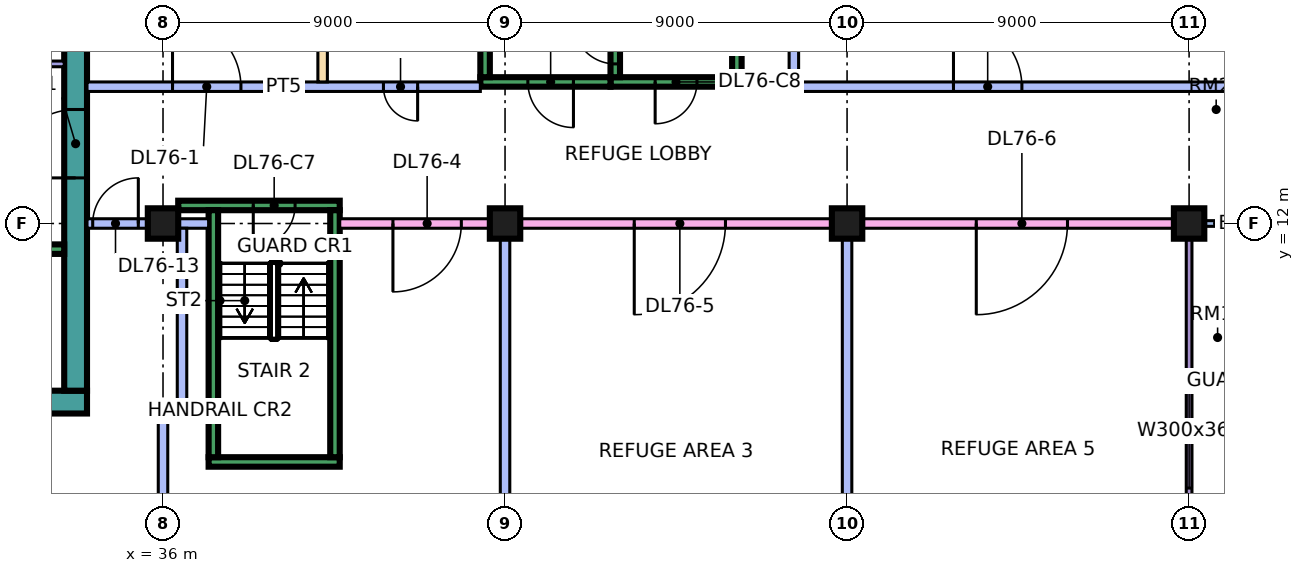
"""IFC4 building model, lengths in metres.
Left out: names, types, materials, properties, quantities, classifications, styles, units other than length and angle.
Written with IfcOpenShell. Run it as: python <this file> out.ifc"""

import sys

from ifc_helpers import new_model, si_unit, direction, frame, frame_2d, origin, origin_2d, place, context, subcontext, project, spatial, rectangle, extrude, element, fill, save


model = new_model("IFC4")
c1 = context("Model", 3, precision=1e-05, world=origin(), true_north=direction((0.0, 1.0)))
c2 = subcontext(c1, "Body", "Model", "MODEL_VIEW")
j1 = project(units=[si_unit("LENGTHUNIT", "METRE"), si_unit("PLANEANGLEUNIT", "RADIAN")], contexts=[c1])
p1 = place(None, origin())
s1 = spatial("IfcSite", under=j1, at=p1, CompositionType="ELEMENT")
p2 = place(p1, origin())
s2 = spatial("IfcBuilding", under=s1, at=p2, CompositionType="ELEMENT")
p3 = place(p2, frame((0.0, 0.0, 322.15)))
s3 = spatial("IfcBuildingStorey", under=s2, at=p3, CompositionType="ELEMENT", Elevation=322.15)
for number, where, z_axis, x_axis in (
    (1, (36.0, 12.0, 0.0), (0.0, 0.0, 1.0), (1.0, 0.0, 0.0)),
    (2, (45.0, 12.0, 0.0), (0.0, 0.0, 1.0), (1.0, 0.0, 0.0)),
    (3, (54.0, 12.0, 0.0), (0.0, 0.0, 1.0), (1.0, 0.0, 0.0)),
    (4, (63.0, 12.0, 0.0), (0.0, 0.0, 1.0), (1.0, 0.0, 0.0)),
):
    element("IfcColumn", number, at=place(p3, frame(where, z_axis=z_axis, x_axis=x_axis)), inside=s3, PredefinedType="COLUMN", context=c2, shape_type="SweptSolid", body=[
        extrude(rectangle(XDim=0.8, YDim=0.8, at=origin_2d()), origin(), (0.0, 0.0, 1.0), 5.5),
    ])
p4 = place(p3, frame((9.0, 7.3, 0.0), z_axis=(0.0, 0.0, 1.0), x_axis=(1.0, 0.0, 0.0)))
e5 = element("IfcWall", 5, at=p4, inside=s3, PredefinedType="SHEAR", context=c2, shape_type="SweptSolid", body=[
    extrude(rectangle(XDim=25.0, YDim=0.6, at=frame_2d((12.5, 0.0))), origin(), (0.0, 0.0, 1.0), 5.5),
])
p5 = place(p3, frame((33.7, 7.6, 0.0), z_axis=(0.0, 0.0, 1.0), x_axis=(0.0, 1.0, 0.0)))
e6 = element("IfcWall", 6, at=p5, inside=s3, PredefinedType="SHEAR", context=c2, shape_type="SweptSolid", body=[
    extrude(rectangle(XDim=11.8, YDim=0.6, at=frame_2d((5.9, 0.0))), origin(), (0.0, 0.0, 1.0), 5.5),
])
p6 = place(p5, frame((5.6, 0.0, 0.0)))
e7 = element("IfcOpeningElement", 7, at=p6, cuts=e6, PredefinedType="OPENING", context=c2, shape_type="SweptSolid", body=[
    extrude(rectangle(XDim=1.8, YDim=2.4, at=frame_2d((0.9, 1.2))), frame((0.0, 0.31, 0.0), z_axis=(0.0, -1.0, 0.0), x_axis=(1.0, 0.0, 0.0)), (0.0, 0.0, 1.0), 0.62),
])
p7 = place(p3, frame((13.45, 11.325, 0.0), z_axis=(0.0, 0.0, 1.0), x_axis=(1.0, 0.0, 0.0)))
e8 = element("IfcWall", 8, at=p7, inside=s3, PredefinedType="SHEAR", context=c2, shape_type="SweptSolid", body=[
    extrude(rectangle(XDim=19.95, YDim=0.25, at=frame_2d((9.975, 0.0))), origin(), (0.0, 0.0, 1.0), 5.5),
])
p8 = place(p7, frame((1.55, 0.0, 0.0)))
e9 = element("IfcOpeningElement", 9, at=p8, cuts=e8, PredefinedType="OPENING", context=c2, shape_type="SweptSolid", body=[
    extrude(rectangle(XDim=0.9, YDim=2.1, at=frame_2d((0.45, 1.05))), frame((0.0, 0.135, 0.0), z_axis=(0.0, -1.0, 0.0), x_axis=(1.0, 0.0, 0.0)), (0.0, 0.0, 1.0), 0.27),
])
p9 = place(p7, frame((5.05, 0.0, 0.0)))
e10 = element("IfcOpeningElement", 10, at=p9, cuts=e8, PredefinedType="OPENING", context=c2, shape_type="SweptSolid", body=[
    extrude(rectangle(XDim=0.9, YDim=2.1, at=frame_2d((0.45, 1.05))), frame((0.0, 0.135, 0.0), z_axis=(0.0, -1.0, 0.0), x_axis=(1.0, 0.0, 0.0)), (0.0, 0.0, 1.0), 0.27),
])
p10 = place(p7, frame((8.425, 0.0, 0.0)))
e11 = element("IfcOpeningElement", 11, at=p10, cuts=e8, PredefinedType="OPENING", context=c2, shape_type="SweptSolid", body=[
    extrude(rectangle(XDim=0.9, YDim=2.1, at=frame_2d((0.45, 1.05))), frame((0.0, 0.135, 0.0), z_axis=(0.0, -1.0, 0.0), x_axis=(1.0, 0.0, 0.0)), (0.0, 0.0, 1.0), 0.27),
])
p11 = place(p7, frame((15.025, 0.0, 0.0)))
e12 = element("IfcOpeningElement", 12, at=p11, cuts=e8, PredefinedType="OPENING", context=c2, shape_type="SweptSolid", body=[
    extrude(rectangle(XDim=0.9, YDim=2.1, at=frame_2d((0.45, 1.05))), frame((0.0, 0.135, 0.0), z_axis=(0.0, -1.0, 0.0), x_axis=(1.0, 0.0, 0.0)), (0.0, 0.0, 1.0), 0.27),
])
p12 = place(p3, frame((37.2, 5.725, 0.0), z_axis=(0.0, 0.0, 1.0), x_axis=(1.0, 0.0, 0.0)))
e13 = element("IfcWall", 13, at=p12, inside=s3, PredefinedType="SHEAR", context=c2, shape_type="SweptSolid", body=[
    extrude(rectangle(XDim=3.45, YDim=0.25, at=frame_2d((1.725, 0.0))), origin(), (0.0, 0.0, 1.0), 5.5),
])
p13 = place(p3, frame((36.4, 12.475, 0.0), z_axis=(0.0, 0.0, 1.0), x_axis=(1.0, 0.0, 0.0)))
e14 = element("IfcWall", 14, at=p13, inside=s3, PredefinedType="SHEAR", context=c2, shape_type="SweptSolid", body=[
    extrude(rectangle(XDim=4.25, YDim=0.25, at=frame_2d((2.125, 0.0))), origin(), (0.0, 0.0, 1.0), 5.5),
])
p14 = place(p13, frame((1.975, 0.0, 0.0)))
e15 = element("IfcOpeningElement", 15, at=p14, cuts=e14, PredefinedType="OPENING", context=c2, shape_type="SweptSolid", body=[
    extrude(rectangle(XDim=1.1, YDim=2.2, at=frame_2d((0.55, 1.1))), frame((0.0, 0.135, 0.0), z_axis=(0.0, -1.0, 0.0), x_axis=(1.0, 0.0, 0.0)), (0.0, 0.0, 1.0), 0.27),
])
for number, where, z_axis, x_axis in (
    (16, (37.325, 5.85, 0.0), (0.0, 0.0, 1.0), (0.0, 1.0, 0.0)),
    (17, (40.525, 5.85, 0.0), (0.0, 0.0, 1.0), (0.0, 1.0, 0.0)),
):
    element("IfcWall", number, at=place(p3, frame(where, z_axis=z_axis, x_axis=x_axis)), inside=s3, PredefinedType="SHEAR", context=c2, shape_type="SweptSolid", body=[
        extrude(rectangle(XDim=6.5, YDim=0.25, at=frame_2d((3.25, 0.0))), origin(), (0.0, 0.0, 1.0), 5.5),
    ])
p15 = place(p3, frame((47.775, 15.725, 0.0), z_axis=(0.0, 0.0, 1.0), x_axis=(1.0, 0.0, 0.0)))
e18 = element("IfcWall", 18, at=p15, inside=s3, PredefinedType="SHEAR", context=c2, shape_type="SweptSolid", body=[
    extrude(rectangle(XDim=3.45, YDim=0.25, at=frame_2d((1.725, 0.0))), origin(), (0.0, 0.0, 1.0), 5.5),
])
p16 = place(p15, frame((1.175, 0.0, 0.0)))
e19 = element("IfcOpeningElement", 19, at=p16, cuts=e18, PredefinedType="OPENING", context=c2, shape_type="SweptSolid", body=[
    extrude(rectangle(XDim=1.1, YDim=2.2, at=frame_2d((0.55, 1.1))), frame((0.0, 0.135, 0.0), z_axis=(0.0, -1.0, 0.0), x_axis=(1.0, 0.0, 0.0)), (0.0, 0.0, 1.0), 0.27),
])
p17 = place(p3, frame((47.9, 15.85, 0.0), z_axis=(0.0, 0.0, 1.0), x_axis=(0.0, 1.0, 0.0)))
e20 = element("IfcWall", 20, at=p17, inside=s3, PredefinedType="SHEAR", context=c2, shape_type="SweptSolid", body=[
    extrude(rectangle(XDim=6.5, YDim=0.25, at=frame_2d((3.25, 0.0))), origin(), (0.0, 0.0, 1.0), 5.5),
])
p18 = place(p17, frame((0.35, 0.0, 0.0)))
e21 = element("IfcOpeningElement", 21, at=p18, cuts=e20, PredefinedType="OPENING", context=c2, shape_type="SweptSolid", body=[
    extrude(rectangle(XDim=1.1, YDim=2.2, at=frame_2d((0.55, 1.1))), frame((0.0, 0.135, 0.0), z_axis=(0.0, -1.0, 0.0), x_axis=(1.0, 0.0, 0.0)), (0.0, 0.0, 1.0), 0.27),
])
p19 = place(p3, frame((51.1, 15.85, 0.0), z_axis=(0.0, 0.0, 1.0), x_axis=(0.0, 1.0, 0.0)))
e22 = element("IfcWall", 22, at=p19, inside=s3, PredefinedType="SHEAR", context=c2, shape_type="SweptSolid", body=[
    extrude(rectangle(XDim=6.5, YDim=0.25, at=frame_2d((3.25, 0.0))), origin(), (0.0, 0.0, 1.0), 5.5),
])
p20 = place(p3, frame((44.35, 15.725, 0.0), z_axis=(0.0, 0.0, 1.0), x_axis=(1.0, 0.0, 0.0)))
e23 = element("IfcWall", 23, at=p20, inside=s3, PredefinedType="SHEAR", context=c2, shape_type="SweptSolid", body=[
    extrude(rectangle(XDim=3.425, YDim=0.25, at=frame_2d((1.712, 0.0))), origin(), (0.0, 0.0, 1.0), 5.5),
])
p21 = place(p20, frame((1.25, 0.0, 0.0)))
e24 = element("IfcOpeningElement", 24, at=p21, cuts=e23, PredefinedType="OPENING", context=c2, shape_type="SweptSolid", body=[
    extrude(rectangle(XDim=1.2, YDim=2.2, at=frame_2d((0.6, 1.1))), frame((0.0, 0.135, 0.0), z_axis=(0.0, -1.0, 0.0), x_axis=(1.0, 0.0, 0.0)), (0.0, 0.0, 1.0), 0.27),
])
p22 = place(p3, frame((44.475, 15.85, 0.0), z_axis=(0.0, 0.0, 1.0), x_axis=(0.0, 1.0, 0.0)))
e25 = element("IfcWall", 25, at=p22, inside=s3, PredefinedType="SHEAR", context=c2, shape_type="SweptSolid", body=[
    extrude(rectangle(XDim=6.5, YDim=0.25, at=frame_2d((3.25, 0.0))), origin(), (0.0, 0.0, 1.0), 5.5),
])
p23 = place(p22, frame((1.75, 0.0, 0.0)))
e26 = element("IfcOpeningElement", 26, at=p23, cuts=e25, PredefinedType="OPENING", context=c2, shape_type="SweptSolid", body=[
    extrude(rectangle(XDim=1.1, YDim=2.2, at=frame_2d((0.55, 1.1))), frame((0.0, 0.135, 0.0), z_axis=(0.0, -1.0, 0.0), x_axis=(1.0, 0.0, 0.0)), (0.0, 0.0, 1.0), 0.27),
])
p24 = place(p22, frame((4.3, 0.0, 0.0)))
e27 = element("IfcOpeningElement", 27, at=p24, cuts=e25, PredefinedType="OPENING", context=c2, shape_type="SweptSolid", body=[
    extrude(rectangle(XDim=1.1, YDim=2.2, at=frame_2d((0.55, 1.1))), frame((0.0, 0.135, 0.0), z_axis=(0.0, -1.0, 0.0), x_axis=(1.0, 0.0, 0.0)), (0.0, 0.0, 1.0), 0.27),
])
p25 = place(p3, frame((63.0, 1.575, 0.0), z_axis=(0.0, 0.0, 1.0), x_axis=(0.0, 1.0, 0.0)))
e28 = element("IfcWall", 28, at=p25, inside=s3, PredefinedType="SOLIDWALL", context=c2, shape_type="SweptSolid", body=[
    extrude(rectangle(XDim=10.35, YDim=0.15, at=frame_2d((5.175, 0.0))), origin(), (0.0, 0.0, 1.0), 5.05),
])
p26 = place(p25, frame((3.462, 0.0, 0.45)))
e29 = element("IfcOpeningElement", 29, at=p26, cuts=e28, PredefinedType="OPENING", context=c2, shape_type="SweptSolid", body=[
    extrude(rectangle(XDim=3.0, YDim=3.6, at=frame_2d((1.5, 1.8))), frame((0.0, 0.085, 0.0), z_axis=(0.0, -1.0, 0.0), x_axis=(1.0, 0.0, 0.0)), (0.0, 0.0, 1.0), 0.17),
])
p27 = place(p3, frame((64.5, 12.0, 0.0), z_axis=(0.0, 0.0, 1.0), x_axis=(-1.0, 0.0, 0.0)))
e30 = element("IfcWall", 30, at=p27, inside=s3, PredefinedType="SOLIDWALL", context=c2, shape_type="SweptSolid", body=[
    extrude(rectangle(XDim=1.5, YDim=0.15, at=frame_2d((0.75, 0.0))), origin(), (0.0, 0.0, 1.0), 5.05),
])
p28 = place(p3, frame((31.4, 16.2, 0.0), z_axis=(0.0, 0.0, 1.0), x_axis=(1.0, 0.0, 0.0)))
e31 = element("IfcWall", 31, at=p28, inside=s3, PredefinedType="PARTITIONING", context=c2, shape_type="SweptSolid", body=[
    extrude(rectangle(XDim=2.0, YDim=0.15, at=frame_2d((1.0, 0.0))), origin(), (0.0, 0.0, 1.0), 5.05),
])
p29 = place(p3, frame((34.0, 12.0, 0.0), z_axis=(0.0, 0.0, 1.0), x_axis=(1.0, 0.0, 0.0)))
e32 = element("IfcWall", 32, at=p29, inside=s3, PredefinedType="PARTITIONING", context=c2, shape_type="SweptSolid", body=[
    extrude(rectangle(XDim=3.2, YDim=0.25, at=frame_2d((1.6, 0.0))), origin(), (0.0, 0.0, 1.0), 5.05),
])
p30 = place(p29, frame((0.15, 0.0, 0.0)))
e33 = element("IfcOpeningElement", 33, at=p30, cuts=e32, PredefinedType="OPENING", context=c2, shape_type="SweptSolid", body=[
    extrude(rectangle(XDim=1.2, YDim=2.1, at=frame_2d((0.6, 1.05))), frame((0.0, 0.135, 0.0), z_axis=(0.0, -1.0, 0.0), x_axis=(1.0, 0.0, 0.0)), (0.0, 0.0, 1.0), 0.27),
])
p31 = place(p3, frame((34.0, 15.6, 0.0), z_axis=(0.0, 0.0, 1.0), x_axis=(1.0, 0.0, 0.0)))
e34 = element("IfcWall", 34, at=p31, inside=s3, PredefinedType="PARTITIONING", context=c2, shape_type="SweptSolid", body=[
    extrude(rectangle(XDim=10.35, YDim=0.25, at=frame_2d((5.175, 0.0))), origin(), (0.0, 0.0, 1.0), 5.05),
])
p32 = place(p31, frame((2.25, 0.0, 0.0)))
e35 = element("IfcOpeningElement", 35, at=p32, cuts=e34, PredefinedType="OPENING", context=c2, shape_type="SweptSolid", body=[
    extrude(rectangle(XDim=1.8, YDim=2.1, at=frame_2d((0.9, 1.05))), frame((0.0, 0.135, 0.0), z_axis=(0.0, -1.0, 0.0), x_axis=(1.0, 0.0, 0.0)), (0.0, 0.0, 1.0), 0.27),
])
p33 = place(p31, frame((7.8, 0.0, 0.0)))
e36 = element("IfcOpeningElement", 36, at=p33, cuts=e34, PredefinedType="OPENING", context=c2, shape_type="SweptSolid", body=[
    extrude(rectangle(XDim=0.9, YDim=2.1, at=frame_2d((0.45, 1.05))), frame((0.0, 0.135, 0.0), z_axis=(0.0, -1.0, 0.0), x_axis=(1.0, 0.0, 0.0)), (0.0, 0.0, 1.0), 0.27),
])
p34 = place(p3, frame((36.0, 0.0, 0.0), z_axis=(0.0, 0.0, 1.0), x_axis=(0.0, 1.0, 0.0)))
e37 = element("IfcWall", 37, at=p34, inside=s3, PredefinedType="PARTITIONING", context=c2, shape_type="SweptSolid", body=[
    extrude(rectangle(XDim=7.125, YDim=0.25, at=frame_2d((3.562, 0.0))), origin(), (0.0, 0.0, 1.0), 5.05),
])
p35 = place(p3, frame((36.125, 7.0, 0.0), z_axis=(0.0, 0.0, 1.0), x_axis=(1.0, 0.0, 0.0)))
e38 = element("IfcWall", 38, at=p35, inside=s3, PredefinedType="PARTITIONING", context=c2, shape_type="SweptSolid", body=[
    extrude(rectangle(XDim=0.25, YDim=0.25, at=frame_2d((0.125, 0.0))), origin(), (0.0, 0.0, 1.0), 5.05),
])
p36 = place(p3, frame((36.5, 6.875, 0.0), z_axis=(0.0, 0.0, 1.0), x_axis=(0.0, 1.0, 0.0)))
e39 = element("IfcWall", 39, at=p36, inside=s3, PredefinedType="PARTITIONING", context=c2, shape_type="SweptSolid", body=[
    extrude(rectangle(XDim=5.0, YDim=0.25, at=frame_2d((2.5, 0.0))), origin(), (0.0, 0.0, 1.0), 5.05),
])
p37 = place(p3, frame((40.2, 15.725, 0.0), z_axis=(0.0, 0.0, 1.0), x_axis=(0.0, 1.0, 0.0)))
e40 = element("IfcWall", 40, at=p37, inside=s3, PredefinedType="PARTITIONING", context=c2, shape_type="SweptSolid", body=[
    extrude(rectangle(XDim=9.863, YDim=0.25, at=frame_2d((4.931, 0.0))), origin(), (0.0, 0.0, 1.0), 5.05),
])
p38 = place(p3, frame((40.65, 12.0, 0.0), z_axis=(0.0, 0.0, 1.0), x_axis=(1.0, 0.0, 0.0)))
e41 = element("IfcWall", 41, at=p38, inside=s3, PredefinedType="PARTITIONING", context=c2, shape_type="SweptSolid", body=[
    extrude(rectangle(XDim=22.35, YDim=0.25, at=frame_2d((11.175, 0.0))), origin(), (0.0, 0.0, 1.0), 2.45),
])
p39 = place(p38, frame((1.4, 0.0, 0.0)))
e42 = element("IfcOpeningElement", 42, at=p39, cuts=e41, PredefinedType="OPENING", context=c2, shape_type="SweptSolid", body=[
    extrude(rectangle(XDim=1.8, YDim=2.1, at=frame_2d((0.9, 1.05))), frame((0.0, 0.135, 0.0), z_axis=(0.0, -1.0, 0.0), x_axis=(1.0, 0.0, 0.0)), (0.0, 0.0, 1.0), 0.27),
])
p40 = place(p38, frame((7.75, 0.0, 0.0)))
e43 = element("IfcOpeningElement", 43, at=p40, cuts=e41, PredefinedType="OPENING", context=c2, shape_type="SweptSolid", body=[
    extrude(rectangle(XDim=2.4, YDim=2.1, at=frame_2d((1.2, 1.05))), frame((0.0, 0.135, 0.0), z_axis=(0.0, -1.0, 0.0), x_axis=(1.0, 0.0, 0.0)), (0.0, 0.0, 1.0), 0.27),
])
p41 = place(p38, frame((16.75, 0.0, 0.0)))
e44 = element("IfcOpeningElement", 44, at=p41, cuts=e41, PredefinedType="OPENING", context=c2, shape_type="SweptSolid", body=[
    extrude(rectangle(XDim=2.4, YDim=2.1, at=frame_2d((1.2, 1.05))), frame((0.0, 0.135, 0.0), z_axis=(0.0, -1.0, 0.0), x_axis=(1.0, 0.0, 0.0)), (0.0, 0.0, 1.0), 0.27),
])
p42 = place(p3, frame((45.0, 0.0, 0.0), z_axis=(0.0, 0.0, 1.0), x_axis=(0.0, 1.0, 0.0)))
e45 = element("IfcWall", 45, at=p42, inside=s3, PredefinedType="PARTITIONING", context=c2, shape_type="SweptSolid", body=[
    extrude(rectangle(XDim=11.875, YDim=0.25, at=frame_2d((5.938, 0.0))), origin(), (0.0, 0.0, 1.0), 5.05),
])
p43 = place(p3, frame((51.225, 15.6, 0.0), z_axis=(0.0, 0.0, 1.0), x_axis=(1.0, 0.0, 0.0)))
e46 = element("IfcWall", 46, at=p43, inside=s3, PredefinedType="PARTITIONING", context=c2, shape_type="SweptSolid", body=[
    extrude(rectangle(XDim=13.125, YDim=0.25, at=frame_2d((6.562, 0.0))), origin(), (0.0, 0.0, 1.0), 5.05),
])
p44 = place(p43, frame((5.575, 0.0, 0.0)))
e47 = element("IfcOpeningElement", 47, at=p44, cuts=e46, PredefinedType="OPENING", context=c2, shape_type="SweptSolid", body=[
    extrude(rectangle(XDim=1.8, YDim=2.1, at=frame_2d((0.9, 1.05))), frame((0.0, 0.135, 0.0), z_axis=(0.0, -1.0, 0.0), x_axis=(1.0, 0.0, 0.0)), (0.0, 0.0, 1.0), 0.27),
])
p45 = place(p3, frame((52.6, 15.725, 0.0), z_axis=(0.0, 0.0, 1.0), x_axis=(0.0, 1.0, 0.0)))
e48 = element("IfcWall", 48, at=p45, inside=s3, PredefinedType="PARTITIONING", context=c2, shape_type="SweptSolid", body=[
    extrude(rectangle(XDim=8.201, YDim=0.25, at=frame_2d((4.101, 0.0))), origin(), (0.0, 0.0, 1.0), 5.05),
])
p46 = place(p3, frame((54.0, 0.074, 0.0), z_axis=(0.0, 0.0, 1.0), x_axis=(0.0, 1.0, 0.0)))
e49 = element("IfcWall", 49, at=p46, inside=s3, PredefinedType="PARTITIONING", context=c2, shape_type="SweptSolid", body=[
    extrude(rectangle(XDim=11.801, YDim=0.25, at=frame_2d((5.9, 0.0))), origin(), (0.0, 0.0, 1.0), 5.05),
])
p47 = place(p26, origin())
e50 = element("IfcWindow", 50, at=p47, inside=s3, PartitioningType="SINGLE_PANEL", PredefinedType="WINDOW", context=c2, shape_type="SweptSolid", body=[
    extrude(rectangle(XDim=3.0, YDim=3.6, at=frame_2d((1.5, 1.8))), frame((0.0, 0.03, 0.0), z_axis=(0.0, -1.0, 0.0), x_axis=(1.0, 0.0, 0.0)), (0.0, 0.0, 1.0), 0.06),
])
fill(e29, e50)
p48 = place(p6, origin())
e51 = element("IfcDoor", 51, at=p48, inside=s3, OperationType="DOUBLE_DOOR_SINGLE_SWING", PredefinedType="DOOR", context=c2, shape_type="SweptSolid", body=[
    extrude(rectangle(XDim=1.8, YDim=2.4, at=frame_2d((0.9, 1.2))), frame((0.0, 0.025, 0.0), z_axis=(0.0, -1.0, 0.0), x_axis=(1.0, 0.0, 0.0)), (0.0, 0.0, 1.0), 0.05),
])
fill(e7, e51)
p49 = place(p14, frame((1.1, 0.0, 0.0), z_axis=(0.0, 0.0, 1.0), x_axis=(-1.0, 0.0, 0.0)))
e52 = element("IfcDoor", 52, at=p49, inside=s3, OperationType="SINGLE_SWING_LEFT", PredefinedType="DOOR", context=c2, shape_type="SweptSolid", body=[
    extrude(rectangle(XDim=1.1, YDim=2.2, at=frame_2d((0.55, 1.1))), frame((0.0, 0.025, 0.0), z_axis=(0.0, -1.0, 0.0), x_axis=(1.0, 0.0, 0.0)), (0.0, 0.0, 1.0), 0.05),
])
fill(e15, e52)
p50 = place(p16, frame((1.1, 0.0, 0.0), z_axis=(0.0, 0.0, 1.0), x_axis=(-1.0, 0.0, 0.0)))
e53 = element("IfcDoor", 53, at=p50, inside=s3, OperationType="SINGLE_SWING_LEFT", PredefinedType="DOOR", context=c2, shape_type="SweptSolid", body=[
    extrude(rectangle(XDim=1.1, YDim=2.2, at=frame_2d((0.55, 1.1))), frame((0.0, 0.025, 0.0), z_axis=(0.0, -1.0, 0.0), x_axis=(1.0, 0.0, 0.0)), (0.0, 0.0, 1.0), 0.05),
])
fill(e19, e53)
p51 = place(p21, origin())
e54 = element("IfcDoor", 54, at=p51, inside=s3, OperationType="SINGLE_SWING_RIGHT", PredefinedType="DOOR", context=c2, shape_type="SweptSolid", body=[
    extrude(rectangle(XDim=1.2, YDim=2.2, at=frame_2d((0.6, 1.1))), frame((0.0, 0.025, 0.0), z_axis=(0.0, -1.0, 0.0), x_axis=(1.0, 0.0, 0.0)), (0.0, 0.0, 1.0), 0.05),
])
fill(e24, e54)
p52 = place(p18, frame((1.1, 0.0, 0.0), z_axis=(0.0, 0.0, 1.0), x_axis=(-1.0, 0.0, 0.0)))
e55 = element("IfcDoor", 55, at=p52, inside=s3, OperationType="SINGLE_SWING_RIGHT", PredefinedType="DOOR", context=c2, shape_type="SweptSolid", body=[
    extrude(rectangle(XDim=1.1, YDim=2.2, at=frame_2d((0.55, 1.1))), frame((0.0, 0.025, 0.0), z_axis=(0.0, -1.0, 0.0), x_axis=(1.0, 0.0, 0.0)), (0.0, 0.0, 1.0), 0.05),
])
fill(e21, e55)
p53 = place(p32, origin())
e56 = element("IfcDoor", 56, at=p53, inside=s3, OperationType="DOUBLE_DOOR_SINGLE_SWING", PredefinedType="DOOR", context=c2, shape_type="SweptSolid", body=[
    extrude(rectangle(XDim=1.8, YDim=2.1, at=frame_2d((0.9, 1.05))), frame((0.0, 0.025, 0.0), z_axis=(0.0, -1.0, 0.0), x_axis=(1.0, 0.0, 0.0)), (0.0, 0.0, 1.0), 0.05),
])
fill(e35, e56)
p54 = place(p33, origin())
e57 = element("IfcDoor", 57, at=p54, inside=s3, OperationType="SINGLE_SWING_RIGHT", PredefinedType="DOOR", context=c2, shape_type="SweptSolid", body=[
    extrude(rectangle(XDim=0.9, YDim=2.1, at=frame_2d((0.45, 1.05))), frame((0.0, 0.025, 0.0), z_axis=(0.0, -1.0, 0.0), x_axis=(1.0, 0.0, 0.0)), (0.0, 0.0, 1.0), 0.05),
])
fill(e36, e57)
p55 = place(p44, origin())
e58 = element("IfcDoor", 58, at=p55, inside=s3, OperationType="DOUBLE_DOOR_SINGLE_SWING", PredefinedType="DOOR", context=c2, shape_type="SweptSolid", body=[
    extrude(rectangle(XDim=1.8, YDim=2.1, at=frame_2d((0.9, 1.05))), frame((0.0, 0.025, 0.0), z_axis=(0.0, -1.0, 0.0), x_axis=(1.0, 0.0, 0.0)), (0.0, 0.0, 1.0), 0.05),
])
fill(e47, e58)
p56 = place(p39, frame((1.8, 0.0, 0.0), z_axis=(0.0, 0.0, 1.0), x_axis=(-1.0, 0.0, 0.0)))
e59 = element("IfcDoor", 59, at=p56, inside=s3, OperationType="DOUBLE_DOOR_SINGLE_SWING", PredefinedType="DOOR", context=c2, shape_type="SweptSolid", body=[
    extrude(rectangle(XDim=1.8, YDim=2.1, at=frame_2d((0.9, 1.05))), frame((0.0, 0.025, 0.0), z_axis=(0.0, -1.0, 0.0), x_axis=(1.0, 0.0, 0.0)), (0.0, 0.0, 1.0), 0.05),
])
fill(e42, e59)
p57 = place(p40, frame((2.4, 0.0, 0.0), z_axis=(0.0, 0.0, 1.0), x_axis=(-1.0, 0.0, 0.0)))
e60 = element("IfcDoor", 60, at=p57, inside=s3, OperationType="DOUBLE_DOOR_SINGLE_SWING", PredefinedType="DOOR", context=c2, shape_type="SweptSolid", body=[
    extrude(rectangle(XDim=2.4, YDim=2.1, at=frame_2d((1.2, 1.05))), frame((0.0, 0.025, 0.0), z_axis=(0.0, -1.0, 0.0), x_axis=(1.0, 0.0, 0.0)), (0.0, 0.0, 1.0), 0.05),
])
fill(e43, e60)
p58 = place(p41, frame((2.4, 0.0, 0.0), z_axis=(0.0, 0.0, 1.0), x_axis=(-1.0, 0.0, 0.0)))
e61 = element("IfcDoor", 61, at=p58, inside=s3, OperationType="DOUBLE_DOOR_SINGLE_SWING", PredefinedType="DOOR", context=c2, shape_type="SweptSolid", body=[
    extrude(rectangle(XDim=2.4, YDim=2.1, at=frame_2d((1.2, 1.05))), frame((0.0, 0.025, 0.0), z_axis=(0.0, -1.0, 0.0), x_axis=(1.0, 0.0, 0.0)), (0.0, 0.0, 1.0), 0.05),
])
fill(e44, e61)
p59 = place(p30, frame((1.2, 0.0, 0.0), z_axis=(0.0, 0.0, 1.0), x_axis=(-1.0, 0.0, 0.0)))
e62 = element("IfcDoor", 62, at=p59, inside=s3, OperationType="SINGLE_SWING_RIGHT", PredefinedType="DOOR", context=c2, shape_type="SweptSolid", body=[
    extrude(rectangle(XDim=1.2, YDim=2.1, at=frame_2d((0.6, 1.05))), frame((0.0, 0.025, 0.0), z_axis=(0.0, -1.0, 0.0), x_axis=(1.0, 0.0, 0.0)), (0.0, 0.0, 1.0), 0.05),
])
fill(e33, e62)
save(model, sys.argv[1])
